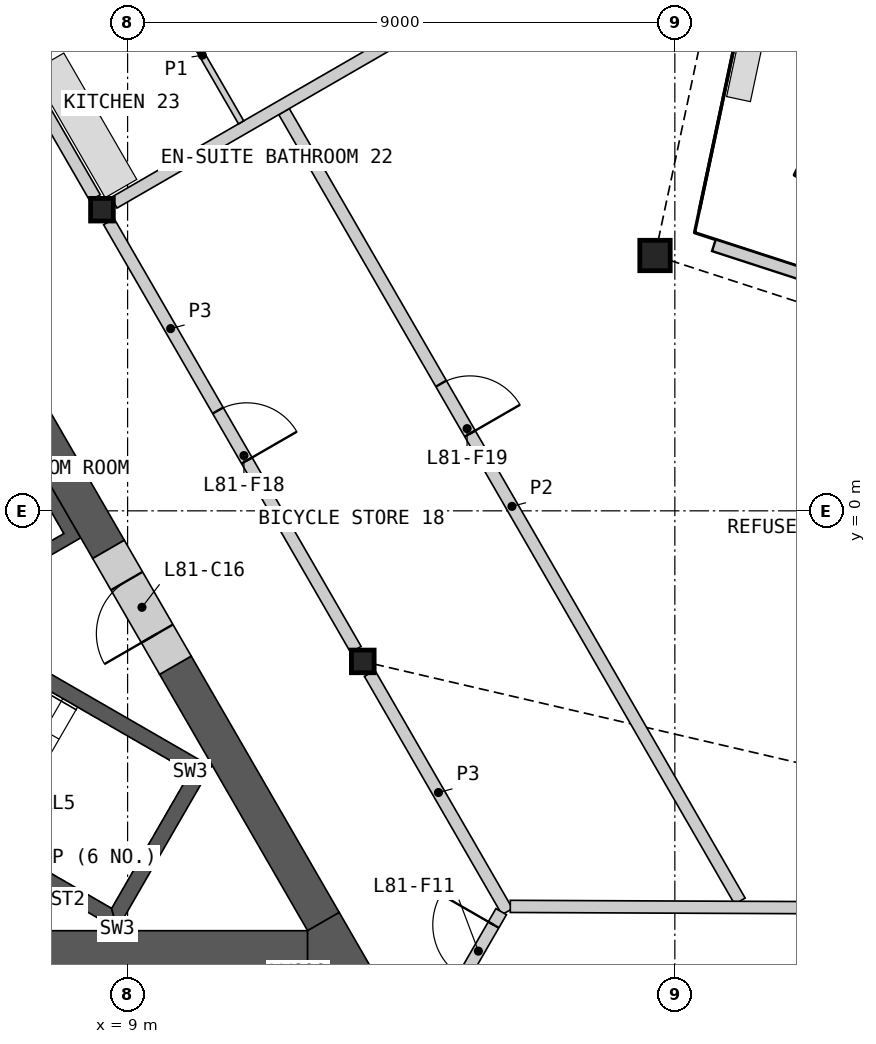
"""IFC4 building model, lengths in metres.
Left out: names, types, materials, properties, quantities, classifications, styles, units other than length and angle.
Written with IfcOpenShell. Run it as: python <this file> out.ifc"""

import sys

from ifc_helpers import new_model, si_unit, direction, frame, frame_2d, origin, origin_2d, place, context, subcontext, project, spatial, polyline, rectangle, hollow_rectangle, i_section, outline, extrude, element, fill, save


model = new_model("IFC4")
c1 = context("Model", 3, precision=1e-05, world=origin(), true_north=direction((0.0, 1.0)))
c2 = subcontext(c1, "Body", "Model", "MODEL_VIEW")
j1 = project(units=[si_unit("LENGTHUNIT", "METRE"), si_unit("PLANEANGLEUNIT", "RADIAN")], contexts=[c1])
p1 = place(None, origin())
s1 = spatial("IfcSite", under=j1, at=p1, CompositionType="ELEMENT")
p2 = place(p1, origin())
s2 = spatial("IfcBuilding", under=s1, at=p2, CompositionType="ELEMENT")
p3 = place(p2, frame((0.0, 0.0, 364.4)))
s3 = spatial("IfcBuildingStorey", under=s2, at=p3, CompositionType="ELEMENT", Elevation=364.4)
p4 = place(p3, frame((17.674, 4.199, 0.0), z_axis=(0.0, 0.0, 1.0), x_axis=(1.0, 0.0, 0.0)))
e1 = element("IfcColumn", 1, at=p4, inside=s3, PredefinedType="COLUMN", context=c2, shape_type="SweptSolid", body=[
    extrude(hollow_rectangle(XDim=0.5, YDim=0.5, WallThickness=0.03, at=origin_2d()), origin(), (0.0, 0.0, 1.0), 3.4),
])
for number, where, z_axis, x_axis in (
    (2, (12.868, -2.476, 0.0), (0.0, 0.0, 1.0), (1.0, 0.0, 0.0)),
    (3, (8.578, 4.953, 0.0), (0.0, 0.0, 1.0), (1.0, 0.0, 0.0)),
):
    element("IfcColumn", number, at=place(p3, frame(where, z_axis=z_axis, x_axis=x_axis)), inside=s3, PredefinedType="COLUMN", context=c2, shape_type="SweptSolid", body=[
        extrude(i_section(OverallWidth=0.374, OverallDepth=0.372, WebThickness=0.016, FlangeThickness=0.026, at=origin_2d()), origin(), (0.0, 0.0, 1.0), 3.4),
    ])
p5 = place(p3, frame((24.601, 2.431, 0.0), z_axis=(0.0, 0.0, 1.0), x_axis=(-0.951060123915, 0.309005891041, 0.0)))
e4 = element("IfcWall", 4, at=p5, inside=s3, PredefinedType="SOLIDWALL", context=c2, shape_type="SweptSolid", body=[
    extrude(rectangle(XDim=6.265, YDim=0.2, at=frame_2d((3.133, 0.0))), origin(), (0.0, 0.0, 1.0), 2.634),
])
p6 = place(p5, frame((2.333, 0.0, 0.0)))
e5 = element("IfcOpeningElement", 5, at=p6, cuts=e4, PredefinedType="OPENING", context=c2, shape_type="SweptSolid", body=[
    extrude(rectangle(XDim=1.6, YDim=2.25, at=frame_2d((0.8, 1.125))), frame((0.0, 0.11, 0.0), z_axis=(0.0, -1.0, 0.0), x_axis=(1.0, 0.0, 0.0)), (0.0, 0.0, 1.0), 0.22),
])
p7 = place(p3, origin())
e6 = element("IfcWall", 6, at=p7, inside=s3, PredefinedType="SHEAR", context=c2, shape_type="SweptSolid", body=[
    extrude(outline(polyline([(1.561, 6.097), (3.731, 7.35), (8.231, -0.444), (6.061, -1.697), (5.96, -1.524), (7.952, -0.374), (6.952, 1.358), (4.96, 0.208), (4.861, 0.381), (6.852, 1.531), (5.852, 3.263), (3.861, 2.113), (3.76, 2.287), (5.752, 3.437), (4.752, 5.169), (2.76, 4.019), (2.66, 4.192), (4.652, 5.342), (3.652, 7.074), (1.66, 5.924), (1.561, 6.097)])), origin(), (0.0, 0.0, 1.0), 3.1),
])
p8 = place(p3, origin())
e7 = element("IfcWall", 7, at=p8, inside=s3, PredefinedType="SHEAR", context=c2, shape_type="SweptSolid", body=[
    extrude(outline(polyline([(3.763, -3.956), (8.83, -6.881), (8.738, -6.539), (3.888, -3.739), (3.763, -3.956)])), origin(), (0.0, 0.0, 1.0), 3.1),
])
p9 = place(p3, origin())
e8 = element("IfcWall", 8, at=p9, inside=s3, PredefinedType="SHEAR", context=c2, shape_type="SweptSolid", body=[
    extrude(outline(polyline([(8.83, -6.881), (10.374, -4.206), (10.032, -4.298), (8.738, -6.539), (8.83, -6.881)])), origin(), (0.0, 0.0, 1.0), 3.1),
])
p10 = place(p3, origin())
e9 = element("IfcWall", 9, at=p10, inside=s3, PredefinedType="SHEAR", context=c2, shape_type="SweptSolid", body=[
    extrude(outline(polyline([(10.032, -4.298), (10.374, -4.206), (5.307, -1.281), (5.182, -1.498), (10.032, -4.298)])), origin(), (0.0, 0.0, 1.0), 3.1),
])
p11 = place(p3, frame((-11.961, -7.206, 0.0), z_axis=(0.0, 0.0, 1.0), x_axis=(1.0, 0.0, 0.0)))
e10 = element("IfcWall", 10, at=p11, inside=s3, PredefinedType="SHEAR", context=c2, shape_type="SweptSolid", body=[
    extrude(rectangle(XDim=23.921, YDim=0.6, at=frame_2d((11.961, 0.0))), origin(), (0.0, 0.0, 1.0), 3.1),
])
p12 = place(p3, frame((8.686, -0.634, 0.0), z_axis=(0.0, 0.0, 1.0), x_axis=(-0.50001836461, 0.866014800712, 0.0)))
e11 = element("IfcWall", 11, at=p12, inside=s3, PredefinedType="SHEAR", context=c2, shape_type="SweptSolid", body=[
    extrude(rectangle(XDim=10.451, YDim=0.6, at=frame_2d((5.225, 0.0))), origin(), (0.0, 0.0, 1.0), 3.1),
])
p13 = place(p3, frame((12.221, -6.756, 0.0), z_axis=(0.0, 0.0, 1.0), x_axis=(-0.50000604952, 0.866021911064, 0.0)))
e12 = element("IfcWall", 12, at=p13, inside=s3, PredefinedType="SHEAR", context=c2, shape_type="SweptSolid", body=[
    extrude(rectangle(XDim=4.869, YDim=0.6, at=frame_2d((2.434, 0.0))), origin(), (0.0, 0.0, 1.0), 3.1),
])
p14 = place(p3, origin())
e13 = element("IfcWall", 13, at=p14, inside=s3, PredefinedType="SHEAR", context=c2, shape_type="SweptSolid", body=[
    extrude(outline(polyline([(11.961, -7.506), (11.961, -6.906), (12.48, -6.606), (13.0, -7.506), (11.961, -7.506)])), origin(), (0.0, 0.0, 1.0), 3.1),
])
p15 = place(p3, frame((9.786, -2.539, 0.0), z_axis=(0.0, 0.0, 1.0), x_axis=(-0.499981787252, 0.866035918664, 0.0)))
e14 = element("IfcWall", 14, at=p15, inside=s3, PredefinedType="SHEAR", context=c2, shape_type="SweptSolid", body=[
    extrude(rectangle(XDim=2.2, YDim=0.6, at=frame_2d((1.1, 0.0))), origin(), (0.0, 0.0, 1.0), 3.1),
])
p16 = place(p15, frame((0.6, 0.0, 0.0)))
e15 = element("IfcOpeningElement", 15, at=p16, cuts=e14, PredefinedType="OPENING", context=c2, shape_type="SweptSolid", body=[
    extrude(rectangle(XDim=1.0, YDim=2.1, at=frame_2d((0.5, 1.05))), frame((0.0, 0.31, 0.0), z_axis=(0.0, -1.0, 0.0), x_axis=(1.0, 0.0, 0.0)), (0.0, 0.0, 1.0), 0.62),
])
p17 = place(p3, frame((4.403, 12.185, 0.0), z_axis=(0.0, 0.0, 1.0), x_axis=(0.499992155518, -0.866029932751, 0.0)))
e16 = element("IfcWall", 16, at=p17, inside=s3, PredefinedType="PARTITIONING", context=c2, shape_type="SweptSolid", body=[
    extrude(rectangle(XDim=8.123, YDim=0.2, at=frame_2d((4.062, 0.0))), origin(), (0.0, 0.0, 1.0), 3.1),
])
p18 = place(p17, frame((3.762, 0.0, 0.0)))
e17 = element("IfcOpeningElement", 17, at=p18, cuts=e16, PredefinedType="OPENING", context=c2, shape_type="SweptSolid", body=[
    extrude(rectangle(XDim=1.0, YDim=2.1, at=frame_2d((0.5, 1.05))), frame((0.0, 0.11, 0.0), z_axis=(0.0, -1.0, 0.0), x_axis=(1.0, 0.0, 0.0)), (0.0, 0.0, 1.0), 0.22),
])
p19 = place(p3, frame((8.692, 4.756, 0.0), z_axis=(0.0, 0.0, 1.0), x_axis=(0.500001682468, -0.866024432409, 0.0)))
e18 = element("IfcWall", 18, at=p19, inside=s3, PredefinedType="PARTITIONING", context=c2, shape_type="SweptSolid", body=[
    extrude(rectangle(XDim=8.124, YDim=0.2, at=frame_2d((4.062, 0.0))), origin(), (0.0, 0.0, 1.0), 3.1),
])
p20 = place(p19, frame((3.587, 0.0, 0.0)))
e19 = element("IfcOpeningElement", 19, at=p20, cuts=e18, PredefinedType="OPENING", context=c2, shape_type="SweptSolid", body=[
    extrude(rectangle(XDim=0.95, YDim=2.1, at=frame_2d((0.475, 1.05))), frame((0.0, 0.11, 0.0), z_axis=(0.0, -1.0, 0.0), x_axis=(1.0, 0.0, 0.0)), (0.0, 0.0, 1.0), 0.22),
])
p21 = place(p3, frame((12.981, -2.673, 0.0), z_axis=(0.0, 0.0, 1.0), x_axis=(0.499974648164, -0.866040040179, 0.0)))
e20 = element("IfcWall", 20, at=p21, inside=s3, PredefinedType="PARTITIONING", context=c2, shape_type="SweptSolid", body=[
    extrude(rectangle(XDim=4.525, YDim=0.2, at=frame_2d((2.263, 0.0))), origin(), (0.0, 0.0, 1.0), 3.1),
])
p22 = place(p3, frame((13.293, -9.797, 0.0), z_axis=(0.0, 0.0, 1.0), x_axis=(0.499977520935, 0.86603838169, 0.0)))
e21 = element("IfcWall", 21, at=p22, inside=s3, PredefinedType="PARTITIONING", context=c2, shape_type="SweptSolid", body=[
    extrude(rectangle(XDim=3.701, YDim=0.2, at=frame_2d((1.851, 0.0))), origin(), (0.0, 0.0, 1.0), 3.1),
])
p23 = place(p22, frame((2.451, 0.0, 0.0)))
e22 = element("IfcOpeningElement", 22, at=p23, cuts=e21, PredefinedType="OPENING", context=c2, shape_type="SweptSolid", body=[
    extrude(rectangle(XDim=1.0, YDim=2.1, at=frame_2d((0.5, 1.05))), frame((0.0, 0.11, 0.0), z_axis=(0.0, -1.0, 0.0), x_axis=(1.0, 0.0, 0.0)), (0.0, 0.0, 1.0), 0.22),
])
p24 = place(p3, frame((11.573, 6.566, 0.0), z_axis=(0.0, 0.0, 1.0), x_axis=(0.499993542657, -0.866029131901, 0.0)))
e23 = element("IfcWall", 23, at=p24, inside=s3, PredefinedType="PARTITIONING", context=c2, shape_type="SweptSolid", body=[
    extrude(rectangle(XDim=14.994, YDim=0.2, at=frame_2d((7.497, 0.0))), origin(), (0.0, 0.0, 1.0), 2.33),
])
p25 = place(p24, frame((5.166, 0.0, 0.0)))
e24 = element("IfcOpeningElement", 24, at=p25, cuts=e23, PredefinedType="OPENING", context=c2, shape_type="SweptSolid", body=[
    extrude(rectangle(XDim=0.95, YDim=2.1, at=frame_2d((0.475, 1.05))), frame((0.0, 0.11, 0.0), z_axis=(0.0, -1.0, 0.0), x_axis=(1.0, 0.0, 0.0)), (0.0, 0.0, 1.0), 0.22),
])
p26 = place(p3, frame((15.294, -6.506, 0.0), z_axis=(0.0, 0.0, 1.0), x_axis=(0.99999116141, -0.004204414611, 0.0)))
e25 = element("IfcWall", 25, at=p26, inside=s3, PredefinedType="PARTITIONING", context=c2, shape_type="SweptSolid", body=[
    extrude(rectangle(XDim=14.807, YDim=0.2, at=frame_2d((7.404, 0.0))), origin(), (0.0, 0.0, 1.0), 2.33),
])
p27 = place(p3, frame((8.775, 5.066, 0.0), z_axis=(0.0, 0.0, 1.0), x_axis=(0.866023724155, 0.500002909193, 0.0)))
e26 = element("IfcWall", 26, at=p27, inside=s3, PredefinedType="PARTITIONING", context=c2, shape_type="SweptSolid", body=[
    extrude(rectangle(XDim=11.655, YDim=0.2, at=frame_2d((5.827, 0.0))), origin(), (0.0, 0.0, 1.0), 2.33),
])
p28 = place(p3, frame((9.592, 8.598, 0.0), z_axis=(0.0, 0.0, 1.0), x_axis=(0.499990435942, -0.866030925526, 0.0)))
e27 = element("IfcWall", 27, at=p28, inside=s3, PredefinedType="PARTITIONING", context=c2, shape_type="SweptSolid", body=[
    extrude(rectangle(XDim=2.55, YDim=0.1, at=frame_2d((1.275, 0.0))), origin(), (0.0, 0.0, 1.0), 2.33),
])
p29 = place(p28, frame((0.25, 0.0, 0.0)))
e28 = element("IfcOpeningElement", 28, at=p29, cuts=e27, PredefinedType="OPENING", context=c2, shape_type="SweptSolid", body=[
    extrude(rectangle(XDim=0.95, YDim=2.1, at=frame_2d((0.475, 1.05))), frame((0.0, 0.06, 0.0), z_axis=(0.0, -1.0, 0.0), x_axis=(1.0, 0.0, 0.0)), (0.0, 0.0, 1.0), 0.12),
])
p30 = place(p16, origin())
e29 = element("IfcDoor", 29, at=p30, inside=s3, OperationType="SINGLE_SWING_LEFT", PredefinedType="DOOR", context=c2, shape_type="SweptSolid", body=[
    extrude(rectangle(XDim=1.0, YDim=2.1, at=frame_2d((0.5, 1.05))), frame((0.0, 0.055, 0.0), z_axis=(0.0, -1.0, 0.0), x_axis=(1.0, 0.0, 0.0)), (0.0, 0.0, 1.0), 0.05),
])
fill(e15, e29)
p31 = place(p23, origin())
e30 = element("IfcDoor", 30, at=p31, inside=s3, OperationType="SINGLE_SWING_RIGHT", PredefinedType="DOOR", context=c2, shape_type="SweptSolid", body=[
    extrude(rectangle(XDim=1.0, YDim=2.1, at=frame_2d((0.5, 1.05))), frame((0.0, 0.025, 0.0), z_axis=(0.0, -1.0, 0.0), x_axis=(1.0, 0.0, 0.0)), (0.0, 0.0, 1.0), 0.05),
])
fill(e22, e30)
p32 = place(p20, origin())
e31 = element("IfcDoor", 31, at=p32, inside=s3, OperationType="SINGLE_SWING_RIGHT", PredefinedType="DOOR", context=c2, shape_type="SweptSolid", body=[
    extrude(rectangle(XDim=0.95, YDim=2.1, at=frame_2d((0.475, 1.05))), frame((0.0, 0.025, 0.0), z_axis=(0.0, -1.0, 0.0), x_axis=(1.0, 0.0, 0.0)), (0.0, 0.0, 1.0), 0.05),
])
fill(e19, e31)
p33 = place(p25, origin())
e32 = element("IfcDoor", 32, at=p33, inside=s3, OperationType="SINGLE_SWING_RIGHT", PredefinedType="DOOR", context=c2, shape_type="SweptSolid", body=[
    extrude(rectangle(XDim=0.95, YDim=2.1, at=frame_2d((0.475, 1.05))), frame((0.0, 0.025, 0.0), z_axis=(0.0, -1.0, 0.0), x_axis=(1.0, 0.0, 0.0)), (0.0, 0.0, 1.0), 0.05),
])
fill(e24, e32)
p34 = place(p29, origin())
e33 = element("IfcDoor", 33, at=p34, inside=s3, OperationType="SINGLE_SWING_LEFT", PredefinedType="DOOR", context=c2, shape_type="SweptSolid", body=[
    extrude(rectangle(XDim=0.95, YDim=2.1, at=frame_2d((0.475, 1.05))), frame((0.0, 0.025, 0.0), z_axis=(0.0, -1.0, 0.0), x_axis=(1.0, 0.0, 0.0)), (0.0, 0.0, 1.0), 0.05),
])
fill(e28, e33)
save(model, sys.argv[1])
